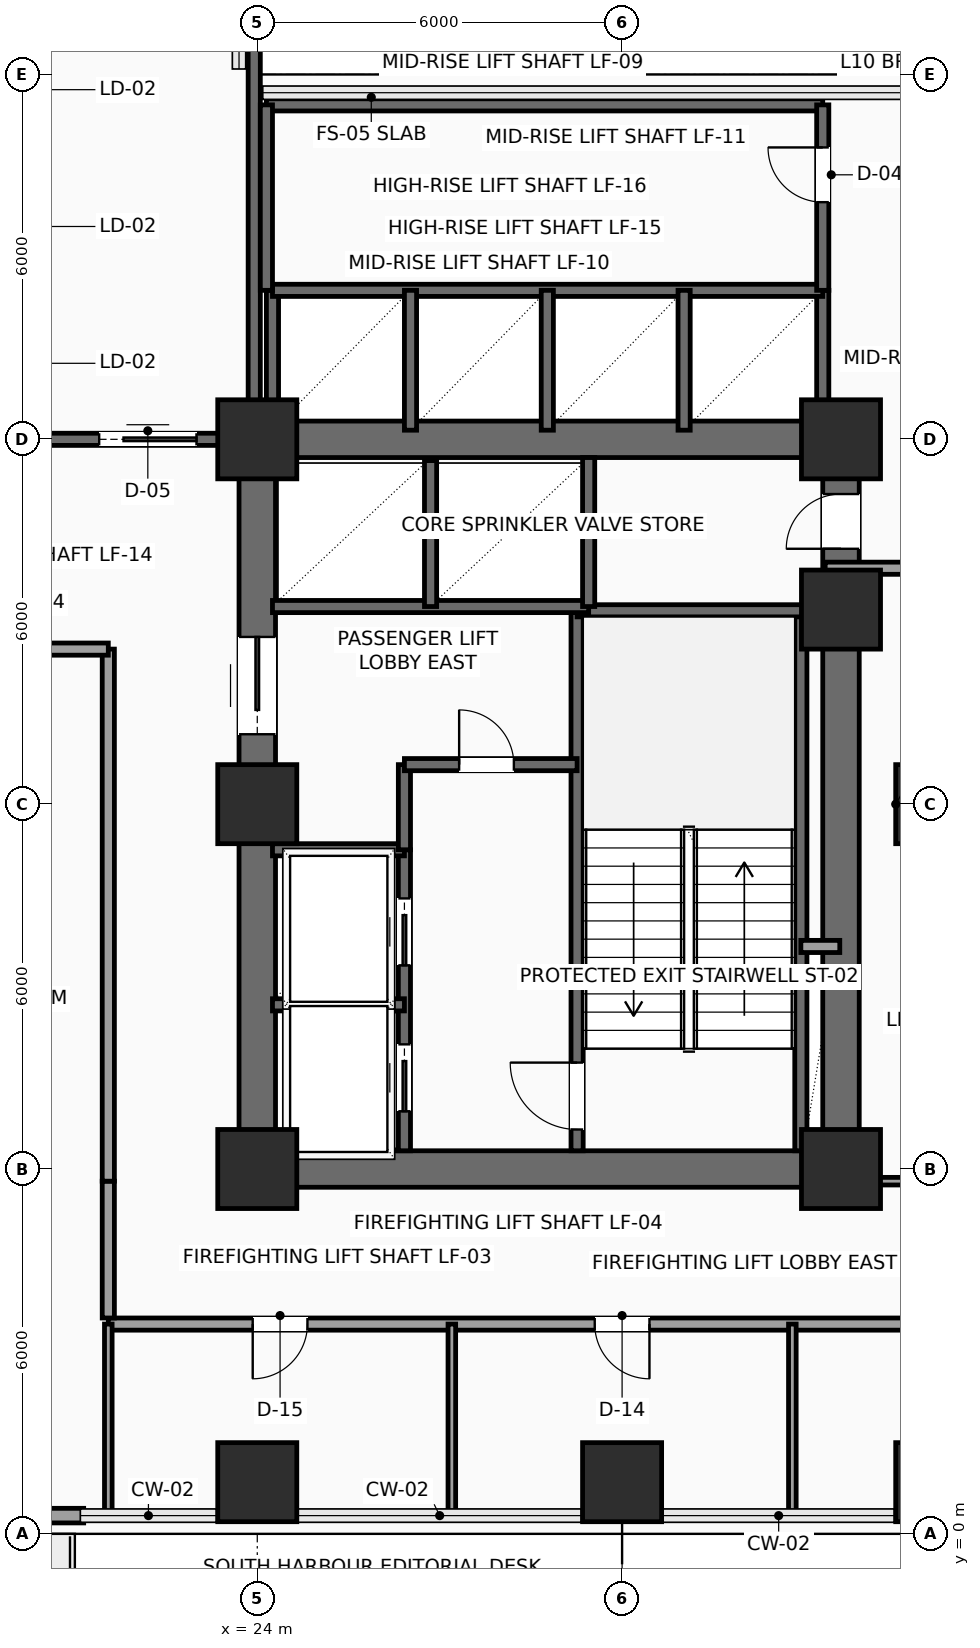
"""IFC4 building model, lengths in metres.
Left out: names, types, materials, properties, quantities, classifications, styles, units other than length and angle.
Written with IfcOpenShell. Run it as: python <this file> out.ifc"""

import sys

from ifc_helpers import new_model, si_unit, direction, frame, frame_2d, origin, origin_2d, place, context, subcontext, project, spatial, rectangle, extrude, element, fill, save


model = new_model("IFC4")
c1 = context("Model", 3, precision=1e-05, world=origin(), true_north=direction((0.0, 1.0)))
c2 = subcontext(c1, "Body", "Model", "MODEL_VIEW")
j1 = project(units=[si_unit("LENGTHUNIT", "METRE"), si_unit("PLANEANGLEUNIT", "RADIAN")], contexts=[c1])
p1 = place(None, origin())
s1 = spatial("IfcSite", under=j1, at=p1, CompositionType="ELEMENT")
p2 = place(p1, origin())
s2 = spatial("IfcBuilding", under=s1, at=p2, CompositionType="ELEMENT")
p3 = place(p2, frame((0.0, 0.0, 48.0)))
s3 = spatial("IfcBuildingStorey", under=s2, at=p3, CompositionType="ELEMENT", Elevation=48.0)
for number, where, z_axis, x_axis in (
    (1, (24.0, 6.0, 0.0), (0.0, 0.0, 1.0), (1.0, 0.0, 0.0)),
    (2, (24.0, 12.0, 0.0), (0.0, 0.0, 1.0), (1.0, 0.0, 0.0)),
    (3, (24.0, 18.0, 0.0), (0.0, 0.0, 1.0), (1.0, 0.0, 0.0)),
    (4, (33.6, 6.0, 0.0), (0.0, 0.0, 1.0), (1.0, 0.0, 0.0)),
    (5, (33.6, 15.2, 0.0), (0.0, 0.0, 1.0), (1.0, 0.0, 0.0)),
    (6, (33.6, 18.0, 0.0), (0.0, 0.0, 1.0), (1.0, 0.0, 0.0)),
    (7, (24.0, 0.85, 0.0), (0.0, 0.0, 1.0), (1.0, 0.0, 0.0)),
    (8, (30.0, 0.85, 0.0), (0.0, 0.0, 1.0), (1.0, 0.0, 0.0)),
    (9, (35.15, 0.85, 0.0), (0.0, 0.0, 1.0), (1.0, 0.0, 0.0)),
    (10, (35.15, 12.0, 0.0), (0.0, 0.0, 1.0), (1.0, 0.0, 0.0)),
):
    element("IfcColumn", number, at=place(p3, frame(where, z_axis=z_axis, x_axis=x_axis)), inside=s3, PredefinedType="COLUMN", context=c2, shape_type="SweptSolid", body=[
        extrude(rectangle(XDim=1.3, YDim=1.3, at=origin_2d()), origin(), (0.0, 0.0, 1.0), 3.9),
    ])
p4 = place(p3, frame((21.145, 0.3, 0.0), z_axis=(0.0, 0.0, 1.0), x_axis=(-1.0, 0.0, 0.0)))
e11 = element("IfcWall", 11, at=p4, inside=s3, PredefinedType="SOLIDWALL", context=c2, shape_type="SweptSolid", body=[
    extrude(rectangle(XDim=9.29, YDim=0.24, at=frame_2d((4.645, 0.0))), origin(), (0.0, 0.0, 1.0), 3.65),
])
p5 = place(p4, frame((4.45, 0.0, 0.0)))
e12 = element("IfcOpeningElement", 12, at=p5, cuts=e11, PredefinedType="OPENING", context=c2, shape_type="SweptSolid", body=[
    extrude(rectangle(XDim=1.05, YDim=2.2, at=frame_2d((0.525, 1.1))), frame((0.0, 0.13, 0.0), z_axis=(0.0, -1.0, 0.0), x_axis=(1.0, 0.0, 0.0)), (0.0, 0.0, 1.0), 0.26),
])
for number, where, z_axis, x_axis in (
    (13, (24.0, 6.0, 0.0), (0.0, 0.0, 1.0), (1.0, 0.0, 0.0)),
    (14, (24.0, 18.0, 0.0), (0.0, 0.0, 1.0), (1.0, 0.0, 0.0)),
):
    element("IfcWall", number, at=place(p3, frame(where, z_axis=z_axis, x_axis=x_axis)), inside=s3, PredefinedType="SHEAR", context=c2, shape_type="SweptSolid", body=[
        extrude(rectangle(XDim=9.6, YDim=0.6, at=frame_2d((4.8, 0.0))), origin(), (0.0, 0.0, 1.0), 3.65),
    ])
p6 = place(p3, frame((24.0, 6.0, 0.0), z_axis=(0.0, 0.0, 1.0), x_axis=(0.0, 1.0, 0.0)))
e15 = element("IfcWall", 15, at=p6, inside=s3, PredefinedType="SHEAR", context=c2, shape_type="SweptSolid", body=[
    extrude(rectangle(XDim=12.0, YDim=0.6, at=frame_2d((6.0, 0.0))), origin(), (0.0, 0.0, 1.0), 3.65),
])
p7 = place(p6, frame((7.15, 0.0, 0.0)))
e16 = element("IfcOpeningElement", 16, at=p7, cuts=e15, PredefinedType="OPENING", context=c2, shape_type="SweptSolid", body=[
    extrude(rectangle(XDim=1.6, YDim=2.3, at=frame_2d((0.8, 1.15))), frame((0.0, 0.31, 0.0), z_axis=(0.0, -1.0, 0.0), x_axis=(1.0, 0.0, 0.0)), (0.0, 0.0, 1.0), 0.62),
])
p8 = place(p3, frame((33.6, 6.0, 0.0), z_axis=(0.0, 0.0, 1.0), x_axis=(0.0, 1.0, 0.0)))
e17 = element("IfcWall", 17, at=p8, inside=s3, PredefinedType="SHEAR", context=c2, shape_type="SweptSolid", body=[
    extrude(rectangle(XDim=12.0, YDim=0.6, at=frame_2d((6.0, 0.0))), origin(), (0.0, 0.0, 1.0), 3.65),
])
p9 = place(p8, frame((10.2, 0.0, 0.0)))
e18 = element("IfcOpeningElement", 18, at=p9, cuts=e17, PredefinedType="OPENING", context=c2, shape_type="SweptSolid", body=[
    extrude(rectangle(XDim=0.9, YDim=2.15, at=frame_2d((0.45, 1.075))), frame((0.0, 0.31, 0.0), z_axis=(0.0, -1.0, 0.0), x_axis=(1.0, 0.0, 0.0)), (0.0, 0.0, 1.0), 0.62),
])
p10 = place(p3, frame((29.26, 6.3, 0.0), z_axis=(0.0, 0.0, 1.0), x_axis=(0.0, 1.0, 0.0)))
e19 = element("IfcWall", 19, at=p10, inside=s3, PredefinedType="SHEAR", context=c2, shape_type="SweptSolid", body=[
    extrude(rectangle(XDim=8.88, YDim=0.2, at=frame_2d((4.44, 0.0))), origin(), (0.0, 0.0, 1.0), 3.65),
])
p11 = place(p10, frame((0.35, 0.0, 0.0)))
e20 = element("IfcOpeningElement", 20, at=p11, cuts=e19, PredefinedType="OPENING", context=c2, shape_type="SweptSolid", body=[
    extrude(rectangle(XDim=1.1, YDim=2.2, at=frame_2d((0.55, 1.1))), frame((0.0, 0.11, 0.0), z_axis=(0.0, -1.0, 0.0), x_axis=(1.0, 0.0, 0.0)), (0.0, 0.0, 1.0), 0.22),
])
p12 = place(p3, frame((32.94, 6.3, 0.0), z_axis=(0.0, 0.0, 1.0), x_axis=(0.0, 1.0, 0.0)))
e21 = element("IfcWall", 21, at=p12, inside=s3, PredefinedType="SHEAR", context=c2, shape_type="SweptSolid", body=[
    extrude(rectangle(XDim=8.88, YDim=0.2, at=frame_2d((4.44, 0.0))), origin(), (0.0, 0.0, 1.0), 3.65),
])
p13 = place(p3, frame((29.26, 15.18, 0.0), z_axis=(0.0, 0.0, 1.0), x_axis=(1.0, 0.0, 0.0)))
e22 = element("IfcWall", 22, at=p13, inside=s3, PredefinedType="SHEAR", context=c2, shape_type="SweptSolid", body=[
    extrude(rectangle(XDim=4.04, YDim=0.2, at=frame_2d((2.02, 0.0))), origin(), (0.0, 0.0, 1.0), 3.65),
])
p14 = place(p3, frame((26.42, 6.3, 0.0), z_axis=(0.0, 0.0, 1.0), x_axis=(0.0, 1.0, 0.0)))
e23 = element("IfcWall", 23, at=p14, inside=s3, PredefinedType="SHEAR", context=c2, shape_type="SweptSolid", body=[
    extrude(rectangle(XDim=4.95, YDim=0.2, at=frame_2d((2.475, 0.0))), origin(), (0.0, 0.0, 1.0), 3.65),
])
p15 = place(p14, frame((0.65, 0.0, 0.0)))
e24 = element("IfcOpeningElement", 24, at=p15, cuts=e23, PredefinedType="OPENING", context=c2, shape_type="SweptSolid", body=[
    extrude(rectangle(XDim=1.1, YDim=2.2, at=frame_2d((0.55, 1.1))), frame((0.0, 0.11, 0.0), z_axis=(0.0, -1.0, 0.0), x_axis=(1.0, 0.0, 0.0)), (0.0, 0.0, 1.0), 0.22),
])
p16 = place(p14, frame((3.05, 0.0, 0.0)))
e25 = element("IfcOpeningElement", 25, at=p16, cuts=e23, PredefinedType="OPENING", context=c2, shape_type="SweptSolid", body=[
    extrude(rectangle(XDim=1.1, YDim=2.2, at=frame_2d((0.55, 1.1))), frame((0.0, 0.11, 0.0), z_axis=(0.0, -1.0, 0.0), x_axis=(1.0, 0.0, 0.0)), (0.0, 0.0, 1.0), 0.22),
])
for number, where, z_axis, x_axis in (
    (26, (24.25, 8.7, 0.0), (0.0, 0.0, 1.0), (1.0, 0.0, 0.0)),
    (27, (24.25, 11.25, 0.0), (0.0, 0.0, 1.0), (1.0, 0.0, 0.0)),
):
    element("IfcWall", number, at=place(p3, frame(where, z_axis=z_axis, x_axis=x_axis)), inside=s3, PredefinedType="SHEAR", context=c2, shape_type="SweptSolid", body=[
        extrude(rectangle(XDim=2.17, YDim=0.2, at=frame_2d((1.085, 0.0))), origin(), (0.0, 0.0, 1.0), 3.65),
    ])
p17 = place(p3, frame((26.42, 11.25, 0.0), z_axis=(0.0, 0.0, 1.0), x_axis=(0.0, 1.0, 0.0)))
e28 = element("IfcWall", 28, at=p17, inside=s3, PredefinedType="SHEAR", context=c2, shape_type="SweptSolid", body=[
    extrude(rectangle(XDim=1.4, YDim=0.2, at=frame_2d((0.7, 0.0))), origin(), (0.0, 0.0, 1.0), 3.65),
])
p18 = place(p3, frame((26.42, 12.65, 0.0), z_axis=(0.0, 0.0, 1.0), x_axis=(1.0, 0.0, 0.0)))
e29 = element("IfcWall", 29, at=p18, inside=s3, PredefinedType="SHEAR", context=c2, shape_type="SweptSolid", body=[
    extrude(rectangle(XDim=2.84, YDim=0.2, at=frame_2d((1.42, 0.0))), origin(), (0.0, 0.0, 1.0), 3.65),
])
p19 = place(p18, frame((0.9, 0.0, 0.0)))
e30 = element("IfcOpeningElement", 30, at=p19, cuts=e29, PredefinedType="OPENING", context=c2, shape_type="SweptSolid", body=[
    extrude(rectangle(XDim=0.9, YDim=2.15, at=frame_2d((0.45, 1.075))), frame((0.0, 0.11, 0.0), z_axis=(0.0, -1.0, 0.0), x_axis=(1.0, 0.0, 0.0)), (0.0, 0.0, 1.0), 0.22),
])
p20 = place(p3, frame((32.94, 9.66, 0.0), z_axis=(0.0, 0.0, 1.0), x_axis=(1.0, 0.0, 0.0)))
e31 = element("IfcWall", 31, at=p20, inside=s3, PredefinedType="SOLIDWALL", context=c2, shape_type="SweptSolid", body=[
    extrude(rectangle(XDim=0.64, YDim=0.2, at=frame_2d((0.32, 0.0))), origin(), (0.0, 0.0, 1.0), 3.65),
])
p21 = place(p3, frame((24.25, 15.25, 0.0), z_axis=(0.0, 0.0, 1.0), x_axis=(1.0, 0.0, 0.0)))
e32 = element("IfcWall", 32, at=p21, inside=s3, PredefinedType="SHEAR", context=c2, shape_type="SweptSolid", body=[
    extrude(rectangle(XDim=5.2, YDim=0.2, at=frame_2d((2.6, 0.0))), origin(), (0.0, 0.0, 1.0), 3.65),
])
p22 = place(p3, frame((26.85, 15.25, 0.0), z_axis=(0.0, 0.0, 1.0), x_axis=(0.0, 1.0, 0.0)))
e33 = element("IfcWall", 33, at=p22, inside=s3, PredefinedType="SHEAR", context=c2, shape_type="SweptSolid", body=[
    extrude(rectangle(XDim=2.4, YDim=0.2, at=frame_2d((1.2, 0.0))), origin(), (0.0, 0.0, 1.0), 3.65),
])
p23 = place(p3, frame((29.45, 15.25, 0.0), z_axis=(0.0, 0.0, 1.0), x_axis=(0.0, 1.0, 0.0)))
e34 = element("IfcWall", 34, at=p23, inside=s3, PredefinedType="SHEAR", context=c2, shape_type="SweptSolid", body=[
    extrude(rectangle(XDim=2.45, YDim=0.2, at=frame_2d((1.225, 0.0))), origin(), (0.0, 0.0, 1.0), 3.65),
])
p24 = place(p3, frame((20.45, 18.0, 0.0), z_axis=(0.0, 0.0, 1.0), x_axis=(1.0, 0.0, 0.0)))
e35 = element("IfcWall", 35, at=p24, inside=s3, PredefinedType="SHEAR", context=c2, shape_type="SweptSolid", body=[
    extrude(rectangle(XDim=3.5, YDim=0.2, at=frame_2d((1.75, 0.0))), origin(), (0.0, 0.0, 1.0), 3.65),
])
p25 = place(p24, frame((0.95, 0.0, 0.0)))
e36 = element("IfcOpeningElement", 36, at=p25, cuts=e35, PredefinedType="OPENING", context=c2, shape_type="SweptSolid", body=[
    extrude(rectangle(XDim=1.6, YDim=2.3, at=frame_2d((0.8, 1.15))), frame((0.0, 0.11, 0.0), z_axis=(0.0, -1.0, 0.0), x_axis=(1.0, 0.0, 0.0)), (0.0, 0.0, 1.0), 0.22),
])
p26 = place(p3, frame((23.95, 18.0, 0.0), z_axis=(0.0, 0.0, 1.0), x_axis=(0.0, 1.0, 0.0)))
e37 = element("IfcWall", 37, at=p26, inside=s3, PredefinedType="SHEAR", context=c2, shape_type="SweptSolid", body=[
    extrude(rectangle(XDim=9.3, YDim=0.2, at=frame_2d((4.65, 0.0))), origin(), (0.0, 0.0, 1.0), 3.65),
])
for number, where, z_axis, x_axis in (
    (38, (33.3, 18.1, 0.0), (0.0, 0.0, 1.0), (0.0, 1.0, 0.0)),
    (39, (24.25, 18.1, 0.0), (0.0, 0.0, 1.0), (0.0, 1.0, 0.0)),
):
    element("IfcWall", number, at=place(p3, frame(where, z_axis=z_axis, x_axis=x_axis)), inside=s3, PredefinedType="SHEAR", context=c2, shape_type="SweptSolid", body=[
        extrude(rectangle(XDim=2.35, YDim=0.2, at=frame_2d((1.175, 0.0))), origin(), (0.0, 0.0, 1.0), 3.65),
    ])
p27 = place(p3, frame((24.25, 20.45, 0.0), z_axis=(0.0, 0.0, 1.0), x_axis=(1.0, 0.0, 0.0)))
e40 = element("IfcWall", 40, at=p27, inside=s3, PredefinedType="SHEAR", context=c2, shape_type="SweptSolid", body=[
    extrude(rectangle(XDim=9.05, YDim=0.2, at=frame_2d((4.525, 0.0))), origin(), (0.0, 0.0, 1.0), 3.65),
])
for number, where, z_axis, x_axis in (
    (41, (26.52, 18.15, 0.0), (0.0, 0.0, 1.0), (0.0, 1.0, 0.0)),
    (42, (28.77, 18.15, 0.0), (0.0, 0.0, 1.0), (0.0, 1.0, 0.0)),
    (43, (31.02, 18.15, 0.0), (0.0, 0.0, 1.0), (0.0, 1.0, 0.0)),
):
    element("IfcWall", number, at=place(p3, frame(where, z_axis=z_axis, x_axis=x_axis)), inside=s3, PredefinedType="SHEAR", context=c2, shape_type="SweptSolid", body=[
        extrude(rectangle(XDim=2.3, YDim=0.2, at=frame_2d((1.15, 0.0))), origin(), (0.0, 0.0, 1.0), 3.65),
    ])
p28 = place(p3, frame((24.15, 23.5, 0.0), z_axis=(0.0, 0.0, 1.0), x_axis=(1.0, 0.0, 0.0)))
e44 = element("IfcWall", 44, at=p28, inside=s3, PredefinedType="SHEAR", context=c2, shape_type="SweptSolid", body=[
    extrude(rectangle(XDim=9.15, YDim=0.2, at=frame_2d((4.575, 0.0))), origin(), (0.0, 0.0, 1.0), 3.65),
])
p29 = place(p3, frame((33.3, 20.45, 0.0), z_axis=(0.0, 0.0, 1.0), x_axis=(0.0, 1.0, 0.0)))
e45 = element("IfcWall", 45, at=p29, inside=s3, PredefinedType="SHEAR", context=c2, shape_type="SweptSolid", body=[
    extrude(rectangle(XDim=3.05, YDim=0.2, at=frame_2d((1.525, 0.0))), origin(), (0.0, 0.0, 1.0), 3.65),
])
p30 = place(p29, frame((1.45, 0.0, 0.0)))
e46 = element("IfcOpeningElement", 46, at=p30, cuts=e45, PredefinedType="OPENING", context=c2, shape_type="SweptSolid", body=[
    extrude(rectangle(XDim=0.9, YDim=2.15, at=frame_2d((0.45, 1.075))), frame((0.0, 0.11, 0.0), z_axis=(0.0, -1.0, 0.0), x_axis=(1.0, 0.0, 0.0)), (0.0, 0.0, 1.0), 0.22),
])
p31 = place(p3, frame((24.15, 20.45, 0.0), z_axis=(0.0, 0.0, 1.0), x_axis=(0.0, 1.0, 0.0)))
e47 = element("IfcWall", 47, at=p31, inside=s3, PredefinedType="SHEAR", context=c2, shape_type="SweptSolid", body=[
    extrude(rectangle(XDim=3.05, YDim=0.2, at=frame_2d((1.525, 0.0))), origin(), (0.0, 0.0, 1.0), 3.65),
])
p32 = place(p3, frame((36.15, 15.88, 0.0), z_axis=(0.0, 0.0, 1.0), x_axis=(-1.0, 0.0, 0.0)))
e48 = element("IfcWall", 48, at=p32, inside=s3, PredefinedType="PARTITIONING", context=c2, shape_type="SweptSolid", body=[
    extrude(rectangle(XDim=2.81, YDim=0.2, at=frame_2d((1.405, 0.0))), origin(), (0.0, 0.0, 1.0), 3.65),
])
p33 = place(p3, frame((36.15, 3.45, 0.0), z_axis=(0.0, 0.0, 1.0), x_axis=(-1.0, 0.0, 0.0)))
e49 = element("IfcWall", 49, at=p33, inside=s3, PredefinedType="PARTITIONING", context=c2, shape_type="SweptSolid", body=[
    extrude(rectangle(XDim=14.6, YDim=0.2, at=frame_2d((7.3, 0.0))), origin(), (0.0, 0.0, 1.0), 3.142),
])
p34 = place(p33, frame((11.325, 0.0, 0.0)))
e50 = element("IfcOpeningElement", 50, at=p34, cuts=e49, PredefinedType="OPENING", context=c2, shape_type="SweptSolid", body=[
    extrude(rectangle(XDim=0.9, YDim=2.1, at=frame_2d((0.45, 1.05))), frame((0.0, 0.11, 0.0), z_axis=(0.0, -1.0, 0.0), x_axis=(1.0, 0.0, 0.0)), (0.0, 0.0, 1.0), 0.22),
])
p35 = place(p33, frame((5.7, 0.0, 0.0)))
e51 = element("IfcOpeningElement", 51, at=p35, cuts=e49, PredefinedType="OPENING", context=c2, shape_type="SweptSolid", body=[
    extrude(rectangle(XDim=0.9, YDim=2.1, at=frame_2d((0.45, 1.05))), frame((0.0, 0.11, 0.0), z_axis=(0.0, -1.0, 0.0), x_axis=(1.0, 0.0, 0.0)), (0.0, 0.0, 1.0), 0.22),
])
p36 = place(p3, frame((21.55, 3.55, 0.0), z_axis=(0.0, 0.0, 1.0), x_axis=(0.0, 1.0, 0.0)))
e52 = element("IfcWall", 52, at=p36, inside=s3, PredefinedType="PARTITIONING", context=c2, shape_type="SweptSolid", body=[
    extrude(rectangle(XDim=2.25, YDim=0.2, at=frame_2d((1.125, 0.0))), origin(), (0.0, 0.0, 1.0), 3.65),
])
p37 = place(p3, frame((21.55, 5.8, 0.0), z_axis=(0.0, 0.0, 1.0), x_axis=(0.0, 1.0, 0.0)))
e53 = element("IfcWall", 53, at=p37, inside=s3, PredefinedType="PARTITIONING", context=c2, shape_type="SweptSolid", body=[
    extrude(rectangle(XDim=8.75, YDim=0.2, at=frame_2d((4.375, 0.0))), origin(), (0.0, 0.0, 1.0), 3.65),
])
p38 = place(p3, frame((21.55, 14.55, 0.0), z_axis=(0.0, 0.0, 1.0), x_axis=(-1.0, 0.0, 0.0)))
e54 = element("IfcWall", 54, at=p38, inside=s3, PredefinedType="PARTITIONING", context=c2, shape_type="SweptSolid", body=[
    extrude(rectangle(XDim=8.95, YDim=0.2, at=frame_2d((4.475, 0.0))), origin(), (0.0, 0.0, 1.0), 3.65),
])
p39 = place(p38, frame((6.0, 0.0, 0.0)))
e55 = element("IfcOpeningElement", 55, at=p39, cuts=e54, PredefinedType="OPENING", context=c2, shape_type="SweptSolid", body=[
    extrude(rectangle(XDim=0.9, YDim=2.1, at=frame_2d((0.45, 1.05))), frame((0.0, 0.11, 0.0), z_axis=(0.0, -1.0, 0.0), x_axis=(1.0, 0.0, 0.0)), (0.0, 0.0, 1.0), 0.22),
])
p40 = place(p38, frame((1.725, 0.0, 0.0)))
e56 = element("IfcOpeningElement", 56, at=p40, cuts=e54, PredefinedType="OPENING", context=c2, shape_type="SweptSolid", body=[
    extrude(rectangle(XDim=0.9, YDim=2.1, at=frame_2d((0.45, 1.05))), frame((0.0, 0.11, 0.0), z_axis=(0.0, -1.0, 0.0), x_axis=(1.0, 0.0, 0.0)), (0.0, 0.0, 1.0), 0.22),
])
for number, where, z_axis, x_axis in (
    (57, (21.55, 0.3, 0.0), (0.0, 0.0, 1.0), (0.0, 1.0, 0.0)),
    (58, (27.2, 0.3, 0.0), (0.0, 0.0, 1.0), (0.0, 1.0, 0.0)),
    (59, (32.8, 0.3, 0.0), (0.0, 0.0, 1.0), (0.0, 1.0, 0.0)),
):
    element("IfcWall", number, at=place(p3, frame(where, z_axis=z_axis, x_axis=x_axis)), inside=s3, PredefinedType="PARTITIONING", context=c2, shape_type="SweptSolid", body=[
        extrude(rectangle(XDim=3.15, YDim=0.125, at=frame_2d((1.575, 0.0))), origin(), (0.0, 0.0, 1.0), 3.65),
    ])
p41 = place(p3, frame((33.65, 5.8, 0.0), z_axis=(0.0, 0.0, 1.0), x_axis=(1.0, 0.0, 0.0)))
e60 = element("IfcWall", 60, at=p41, inside=s3, PredefinedType="PARTITIONING", context=c2, shape_type="SweptSolid", body=[
    extrude(rectangle(XDim=2.5, YDim=0.125, at=frame_2d((1.25, 0.0))), origin(), (0.0, 0.0, 1.0), 2.992),
])
p42 = place(p7, origin())
e61 = element("IfcDoor", 61, at=p42, inside=s3, OperationType="DOUBLE_DOOR_SLIDING", PredefinedType="DOOR", context=c2, shape_type="SweptSolid", body=[
    extrude(rectangle(XDim=1.6, YDim=2.3, at=frame_2d((0.8, 1.15))), frame((0.0, 0.025, 0.0), z_axis=(0.0, -1.0, 0.0), x_axis=(1.0, 0.0, 0.0)), (0.0, 0.0, 1.0), 0.05),
])
fill(e16, e61)
p43 = place(p9, origin())
e62 = element("IfcDoor", 62, at=p43, inside=s3, OperationType="SINGLE_SWING_LEFT", PredefinedType="DOOR", context=c2, shape_type="SweptSolid", body=[
    extrude(rectangle(XDim=0.9, YDim=2.15, at=frame_2d((0.45, 1.075))), frame((0.0, 0.025, 0.0), z_axis=(0.0, -1.0, 0.0), x_axis=(1.0, 0.0, 0.0)), (0.0, 0.0, 1.0), 0.05),
])
fill(e18, e62)
p44 = place(p11, origin())
e63 = element("IfcDoor", 63, at=p44, inside=s3, OperationType="SINGLE_SWING_RIGHT", PredefinedType="DOOR", context=c2, shape_type="SweptSolid", body=[
    extrude(rectangle(XDim=1.1, YDim=2.2, at=frame_2d((0.55, 1.1))), frame((0.0, 0.025, 0.0), z_axis=(0.0, -1.0, 0.0), x_axis=(1.0, 0.0, 0.0)), (0.0, 0.0, 1.0), 0.05),
])
fill(e20, e63)
p45 = place(p15, origin())
e64 = element("IfcDoor", 64, at=p45, inside=s3, OperationType="SLIDING_TO_LEFT", PredefinedType="DOOR", context=c2, shape_type="SweptSolid", body=[
    extrude(rectangle(XDim=1.1, YDim=2.2, at=frame_2d((0.55, 1.1))), frame((0.0, 0.025, 0.0), z_axis=(0.0, -1.0, 0.0), x_axis=(1.0, 0.0, 0.0)), (0.0, 0.0, 1.0), 0.05),
])
fill(e24, e64)
p46 = place(p16, origin())
e65 = element("IfcDoor", 65, at=p46, inside=s3, OperationType="SLIDING_TO_LEFT", PredefinedType="DOOR", context=c2, shape_type="SweptSolid", body=[
    extrude(rectangle(XDim=1.1, YDim=2.2, at=frame_2d((0.55, 1.1))), frame((0.0, 0.025, 0.0), z_axis=(0.0, -1.0, 0.0), x_axis=(1.0, 0.0, 0.0)), (0.0, 0.0, 1.0), 0.05),
])
fill(e25, e65)
p47 = place(p19, origin())
e66 = element("IfcDoor", 66, at=p47, inside=s3, OperationType="SINGLE_SWING_LEFT", PredefinedType="DOOR", context=c2, shape_type="SweptSolid", body=[
    extrude(rectangle(XDim=0.9, YDim=2.15, at=frame_2d((0.45, 1.075))), frame((0.0, 0.025, 0.0), z_axis=(0.0, -1.0, 0.0), x_axis=(1.0, 0.0, 0.0)), (0.0, 0.0, 1.0), 0.05),
])
fill(e30, e66)
p48 = place(p25, origin())
e67 = element("IfcDoor", 67, at=p48, inside=s3, OperationType="DOUBLE_DOOR_SLIDING", PredefinedType="DOOR", context=c2, shape_type="SweptSolid", body=[
    extrude(rectangle(XDim=1.6, YDim=2.3, at=frame_2d((0.8, 1.15))), frame((0.0, 0.025, 0.0), z_axis=(0.0, -1.0, 0.0), x_axis=(1.0, 0.0, 0.0)), (0.0, 0.0, 1.0), 0.05),
])
fill(e36, e67)
p49 = place(p30, origin())
e68 = element("IfcDoor", 68, at=p49, inside=s3, OperationType="SINGLE_SWING_RIGHT", PredefinedType="DOOR", context=c2, shape_type="SweptSolid", body=[
    extrude(rectangle(XDim=0.9, YDim=2.15, at=frame_2d((0.45, 1.075))), frame((0.0, 0.025, 0.0), z_axis=(0.0, -1.0, 0.0), x_axis=(1.0, 0.0, 0.0)), (0.0, 0.0, 1.0), 0.05),
])
fill(e46, e68)
p50 = place(p34, origin())
e69 = element("IfcDoor", 69, at=p50, inside=s3, OperationType="SINGLE_SWING_RIGHT", PredefinedType="DOOR", context=c2, shape_type="SweptSolid", body=[
    extrude(rectangle(XDim=0.9, YDim=2.1, at=frame_2d((0.45, 1.05))), frame((0.0, 0.025, 0.0), z_axis=(0.0, -1.0, 0.0), x_axis=(1.0, 0.0, 0.0)), (0.0, 0.0, 1.0), 0.05),
])
fill(e50, e69)
p51 = place(p35, origin())
e70 = element("IfcDoor", 70, at=p51, inside=s3, OperationType="SINGLE_SWING_LEFT", PredefinedType="DOOR", context=c2, shape_type="SweptSolid", body=[
    extrude(rectangle(XDim=0.9, YDim=2.1, at=frame_2d((0.45, 1.05))), frame((0.0, 0.025, 0.0), z_axis=(0.0, -1.0, 0.0), x_axis=(1.0, 0.0, 0.0)), (0.0, 0.0, 1.0), 0.05),
])
fill(e51, e70)
save(model, sys.argv[1])
